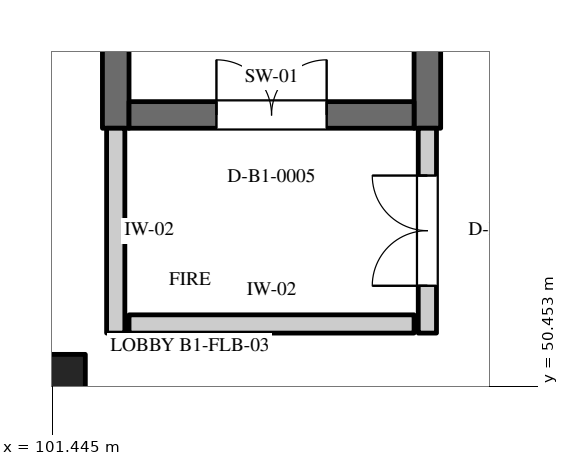
"""IFC4 building model, lengths in metres.
Left out: names, types, materials, properties, quantities, classifications, styles, units other than length and angle.
Written with IfcOpenShell. Run it as: python <this file> out.ifc"""

import sys

from ifc_helpers import new_model, si_unit, direction, frame, frame_2d, origin, origin_2d, place, context, subcontext, project, spatial, rectangle, extrude, element, fill, save


model = new_model("IFC4")
c1 = context("Model", 3, precision=1e-05, world=origin(), true_north=direction((0.0, 1.0)))
c2 = subcontext(c1, "Body", "Model", "MODEL_VIEW")
j1 = project(units=[si_unit("LENGTHUNIT", "METRE"), si_unit("PLANEANGLEUNIT", "RADIAN")], contexts=[c1])
p1 = place(None, origin())
s1 = spatial("IfcSite", under=j1, at=p1, CompositionType="ELEMENT")
p2 = place(p1, origin())
s2 = spatial("IfcBuilding", under=s1, at=p2, CompositionType="ELEMENT")
p3 = place(p2, frame((0.0, 0.0, -4.5)))
s3 = spatial("IfcBuildingStorey", under=s2, at=p3, CompositionType="ELEMENT", Elevation=-4.5)
p4 = place(p3, frame((101.4, 50.4, 0.0), z_axis=(0.0, 0.0, 1.0), x_axis=(1.0, 0.0, 0.0)))
e1 = element("IfcColumn", 1, at=p4, inside=s3, PredefinedType="COLUMN", context=c2, shape_type="SweptSolid", body=[
    extrude(rectangle(XDim=0.95, YDim=0.95, at=origin_2d()), origin(), (0.0, 0.0, 1.0), 4.5),
])
for number, where, z_axis, x_axis in (
    (2, (102.275, 53.85, 0.0), (0.0, 0.0, 1.0), (0.0, 1.0, 0.0)),
    (3, (106.375, 53.85, 0.0), (0.0, 0.0, 1.0), (0.0, 1.0, 0.0)),
):
    element("IfcWall", number, at=place(p3, frame(where, z_axis=z_axis, x_axis=x_axis)), inside=s3, PredefinedType="SHEAR", context=c2, shape_type="SweptSolid", body=[
        extrude(rectangle(XDim=10.5, YDim=0.35, at=frame_2d((5.25, 0.0))), origin(), (0.0, 0.0, 1.0), 4.5),
    ])
p5 = place(p3, frame((102.45, 54.025, 0.0), z_axis=(0.0, 0.0, 1.0), x_axis=(1.0, 0.0, 0.0)))
e4 = element("IfcWall", 4, at=p5, inside=s3, PredefinedType="SHEAR", context=c2, shape_type="SweptSolid", body=[
    extrude(rectangle(XDim=3.75, YDim=0.35, at=frame_2d((1.875, 0.0))), origin(), (0.0, 0.0, 1.0), 4.15),
])
p6 = place(p5, frame((1.15, 0.0, 0.0)))
e5 = element("IfcOpeningElement", 5, at=p6, cuts=e4, PredefinedType="OPENING", context=c2, shape_type="SweptSolid", body=[
    extrude(rectangle(XDim=1.45, YDim=2.2, at=frame_2d((0.725, 1.1))), frame((0.0, 0.187, 0.0), z_axis=(0.0, -1.0, 0.0), x_axis=(1.0, 0.0, 0.0)), (0.0, 0.0, 1.0), 0.374),
])
p7 = place(p3, frame((102.275, 51.155, 0.0), z_axis=(0.0, 0.0, 1.0), x_axis=(0.0, 1.0, 0.0)))
e6 = element("IfcWall", 6, at=p7, inside=s3, PredefinedType="STANDARD", context=c2, shape_type="SweptSolid", body=[
    extrude(rectangle(XDim=2.695, YDim=0.24, at=frame_2d((1.348, 0.0))), origin(), (0.0, 0.0, 1.0), 4.15),
])
p8 = place(p3, frame((106.375, 51.155, 0.0), z_axis=(0.0, 0.0, 1.0), x_axis=(0.0, 1.0, 0.0)))
e7 = element("IfcWall", 7, at=p8, inside=s3, PredefinedType="STANDARD", context=c2, shape_type="SweptSolid", body=[
    extrude(rectangle(XDim=2.695, YDim=0.24, at=frame_2d((1.348, 0.0))), origin(), (0.0, 0.0, 1.0), 4.15),
])
p9 = place(p8, frame((0.623, 0.0, 0.0)))
e8 = element("IfcOpeningElement", 8, at=p9, cuts=e7, PredefinedType="OPENING", context=c2, shape_type="SweptSolid", body=[
    extrude(rectangle(XDim=1.45, YDim=2.2, at=frame_2d((0.725, 1.1))), frame((0.0, 0.132, 0.0), z_axis=(0.0, -1.0, 0.0), x_axis=(1.0, 0.0, 0.0)), (0.0, 0.0, 1.0), 0.264),
])
p10 = place(p3, frame((102.45, 51.275, 0.0), z_axis=(0.0, 0.0, 1.0), x_axis=(1.0, 0.0, 0.0)))
e9 = element("IfcWall", 9, at=p10, inside=s3, PredefinedType="STANDARD", context=c2, shape_type="SweptSolid", body=[
    extrude(rectangle(XDim=3.75, YDim=0.24, at=frame_2d((1.875, 0.0))), origin(), (0.0, 0.0, 1.0), 4.15),
])
p11 = place(p6, origin())
e10 = element("IfcDoor", 10, at=p11, inside=s3, OperationType="DOUBLE_DOOR_SINGLE_SWING", PredefinedType="DOOR", context=c2, shape_type="SweptSolid", body=[
    extrude(rectangle(XDim=1.45, YDim=2.2, at=frame_2d((0.725, 1.1))), frame((0.0, 0.025, 0.0), z_axis=(0.0, -1.0, 0.0), x_axis=(1.0, 0.0, 0.0)), (0.0, 0.0, 1.0), 0.05),
])
fill(e5, e10)
p12 = place(p9, origin())
e11 = element("IfcDoor", 11, at=p12, inside=s3, OperationType="DOUBLE_DOOR_SINGLE_SWING", PredefinedType="DOOR", context=c2, shape_type="SweptSolid", body=[
    extrude(rectangle(XDim=1.45, YDim=2.2, at=frame_2d((0.725, 1.1))), frame((0.0, 0.025, 0.0), z_axis=(0.0, -1.0, 0.0), x_axis=(1.0, 0.0, 0.0)), (0.0, 0.0, 1.0), 0.05),
])
fill(e8, e11)
save(model, sys.argv[1])
